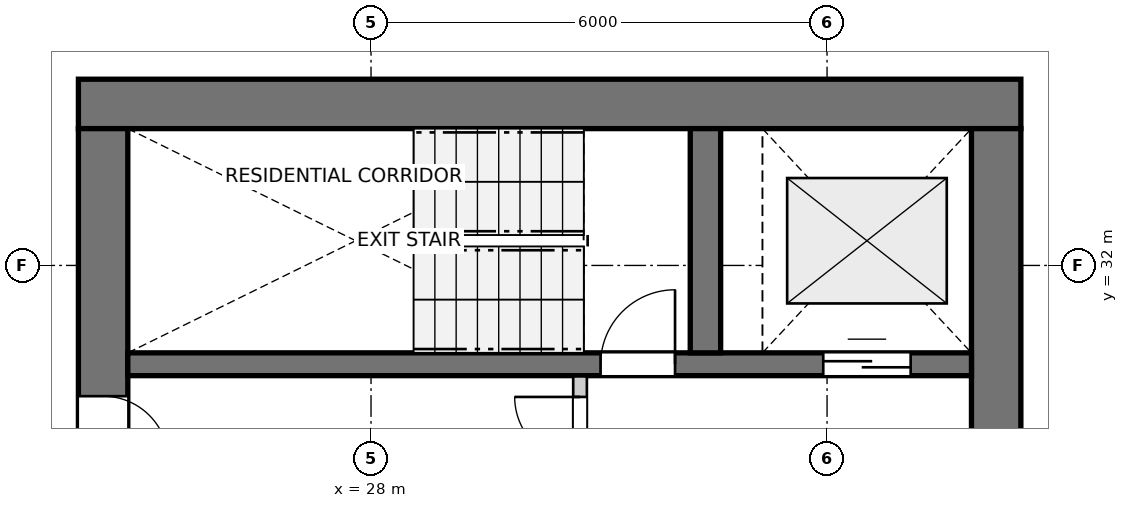
"""IFC4 building model, lengths in metres.
Left out: names, types, materials, properties, quantities, classifications, styles, units other than length and angle.
Written with IfcOpenShell. Run it as: python <this file> out.ifc"""

import sys

from ifc_helpers import new_model, si_unit, direction, frame, frame_2d, origin, place, context, subcontext, project, spatial, rectangle, extrude, source, transform, mapped, element, fill, save


model = new_model("IFC4")
c1 = context("Model", 3, precision=1e-05, world=origin(), true_north=direction((0.0, 1.0)))
c2 = subcontext(c1, "Body", "Model", "MODEL_VIEW")
j1 = project(units=[si_unit("LENGTHUNIT", "METRE"), si_unit("PLANEANGLEUNIT", "RADIAN")], contexts=[c1])
p1 = place(None, origin())
s1 = spatial("IfcSite", under=j1, at=p1, CompositionType="ELEMENT")
p2 = place(p1, origin())
s2 = spatial("IfcBuilding", under=s1, at=p2, CompositionType="ELEMENT")
p3 = place(p2, frame((0.0, 0.0, 76.8)))
s3 = spatial("IfcBuildingStorey", under=s2, at=p3, CompositionType="ELEMENT", Elevation=76.8)
p4 = place(p3, frame((36.55, 34.125, 0.0), z_axis=(0.0, 0.0, 1.0), x_axis=(-1.0, 0.0, 0.0)))
e1 = element("IfcWall", 1, at=p4, inside=s3, PredefinedType="SHEAR", context=c2, shape_type="SweptSolid", body=[
    extrude(rectangle(XDim=12.4, YDim=0.65, at=frame_2d((6.2, 0.0))), origin(), (0.0, 0.0, 1.0), 2.935),
])
p5 = place(p3, frame((24.475, 33.8, 0.0), z_axis=(0.0, 0.0, 1.0), x_axis=(0.0, -1.0, 0.0)))
e2 = element("IfcWall", 2, at=p5, inside=s3, PredefinedType="SHEAR", context=c2, shape_type="SweptSolid", body=[
    extrude(rectangle(XDim=15.6, YDim=0.65, at=frame_2d((7.8, 0.0))), origin(), (0.0, 0.0, 1.0), 2.935),
])
p6 = place(p5, frame((7.05, 0.0, 0.0)))
e3 = element("IfcOpeningElement", 3, at=p6, cuts=e2, PredefinedType="OPENING", context=c2, shape_type="SweptSolid", body=[
    extrude(rectangle(XDim=1.5, YDim=2.15, at=frame_2d((0.75, 1.075))), frame((0.0, 0.335, 0.0), z_axis=(0.0, -1.0, 0.0), x_axis=(1.0, 0.0, 0.0)), (0.0, 0.0, 1.0), 0.67),
])
p7 = place(p5, frame((3.52, 0.0, 0.0)))
e4 = element("IfcOpeningElement", 4, at=p7, cuts=e2, PredefinedType="OPENING", context=c2, shape_type="SweptSolid", body=[
    extrude(rectangle(XDim=0.86, YDim=2.05, at=frame_2d((0.43, 1.025))), frame((0.0, 0.335, 0.0), z_axis=(0.0, -1.0, 0.0), x_axis=(1.0, 0.0, 0.0)), (0.0, 0.0, 1.0), 0.67),
])
p8 = place(p5, frame((11.22, 0.0, 0.0)))
e5 = element("IfcOpeningElement", 5, at=p8, cuts=e2, PredefinedType="OPENING", context=c2, shape_type="SweptSolid", body=[
    extrude(rectangle(XDim=0.86, YDim=2.05, at=frame_2d((0.43, 1.025))), frame((0.0, 0.335, 0.0), z_axis=(0.0, -1.0, 0.0), x_axis=(1.0, 0.0, 0.0)), (0.0, 0.0, 1.0), 0.67),
])
p9 = place(p3, frame((36.225, 18.2, 0.0), z_axis=(0.0, 0.0, 1.0), x_axis=(0.0, 1.0, 0.0)))
e6 = element("IfcWall", 6, at=p9, inside=s3, PredefinedType="SHEAR", context=c2, shape_type="SweptSolid", body=[
    extrude(rectangle(XDim=15.6, YDim=0.65, at=frame_2d((7.8, 0.0))), origin(), (0.0, 0.0, 1.0), 2.935),
])
p10 = place(p9, frame((4.25, 0.0, 0.0)))
e7 = element("IfcOpeningElement", 7, at=p10, cuts=e6, PredefinedType="OPENING", context=c2, shape_type="SweptSolid", body=[
    extrude(rectangle(XDim=1.1, YDim=2.15, at=frame_2d((0.55, 1.075))), frame((0.0, 0.335, 0.0), z_axis=(0.0, -1.0, 0.0), x_axis=(1.0, 0.0, 0.0)), (0.0, 0.0, 1.0), 0.67),
])
p11 = place(p9, frame((10.25, 0.0, 0.0)))
e8 = element("IfcOpeningElement", 8, at=p11, cuts=e6, PredefinedType="OPENING", context=c2, shape_type="SweptSolid", body=[
    extrude(rectangle(XDim=1.1, YDim=2.15, at=frame_2d((0.55, 1.075))), frame((0.0, 0.335, 0.0), z_axis=(0.0, -1.0, 0.0), x_axis=(1.0, 0.0, 0.0)), (0.0, 0.0, 1.0), 0.67),
])
p12 = place(p3, frame((24.8, 30.7, 0.0), z_axis=(0.0, 0.0, 1.0), x_axis=(1.0, 0.0, 0.0)))
e9 = element("IfcWall", 9, at=p12, inside=s3, PredefinedType="SHEAR", context=c2, shape_type="SweptSolid", body=[
    extrude(rectangle(XDim=11.1, YDim=0.3, at=frame_2d((5.55, 0.0))), origin(), (0.0, 0.0, 1.0), 2.935),
])
p13 = place(p12, frame((6.22, 0.0, 0.0)))
e10 = element("IfcOpeningElement", 10, at=p13, cuts=e9, PredefinedType="OPENING", context=c2, shape_type="SweptSolid", body=[
    extrude(rectangle(XDim=0.98, YDim=2.15, at=frame_2d((0.49, 1.075))), frame((0.0, 0.16, 0.0), z_axis=(0.0, -1.0, 0.0), x_axis=(1.0, 0.0, 0.0)), (0.0, 0.0, 1.0), 0.32),
])
p14 = place(p12, frame((9.15, 0.0, 0.0)))
e11 = element("IfcOpeningElement", 11, at=p14, cuts=e9, PredefinedType="OPENING", context=c2, shape_type="SweptSolid", body=[
    extrude(rectangle(XDim=1.15, YDim=2.15, at=frame_2d((0.575, 1.075))), frame((0.0, 0.16, 0.0), z_axis=(0.0, -1.0, 0.0), x_axis=(1.0, 0.0, 0.0)), (0.0, 0.0, 1.0), 0.32),
])
p15 = place(p3, frame((32.4, 30.85, 0.0), z_axis=(0.0, 0.0, 1.0), x_axis=(0.0, 1.0, 0.0)))
e12 = element("IfcWall", 12, at=p15, inside=s3, PredefinedType="SHEAR", context=c2, shape_type="SweptSolid", body=[
    extrude(rectangle(XDim=2.95, YDim=0.4, at=frame_2d((1.475, 0.0))), origin(), (0.0, 0.0, 1.0), 2.935),
])
p16 = place(p3, frame((30.75, 27.43, 0.0), z_axis=(0.0, 0.0, 1.0), x_axis=(0.0, 1.0, 0.0)))
e13 = element("IfcWall", 13, at=p16, inside=s3, PredefinedType="PARTITIONING", context=c2, shape_type="SweptSolid", body=[
    extrude(rectangle(XDim=3.11, YDim=0.18, at=frame_2d((1.555, 0.0))), origin(), (0.0, 0.0, 1.0), 2.935),
])
p17 = place(p16, frame((1.98, 0.0, 0.0)))
e14 = element("IfcOpeningElement", 14, at=p17, cuts=e13, PredefinedType="OPENING", context=c2, shape_type="SweptSolid", body=[
    extrude(rectangle(XDim=0.86, YDim=2.05, at=frame_2d((0.43, 1.025))), frame((0.0, 0.1, 0.0), z_axis=(0.0, -1.0, 0.0), x_axis=(1.0, 0.0, 0.0)), (0.0, 0.0, 1.0), 0.2),
])
m1 = source(origin(), c2, "Body", "SweptSolid", [
    extrude(rectangle(XDim=0.98, YDim=2.15, at=frame_2d((0.49, 1.075))), frame((0.0, 0.025, 0.0), z_axis=(0.0, -1.0, 0.0), x_axis=(1.0, 0.0, 0.0)), (0.0, 0.0, 1.0), 0.05),
])
p18 = place(p13, origin())
e15 = element("IfcDoor", 15, at=p18, inside=s3, OperationType="SINGLE_SWING_RIGHT", PredefinedType="DOOR", context=c2, shape_type="MappedRepresentation", body=[
    mapped(m1, transform((0.0, 0.0, 0.0), x_axis=(1.0, 0.0, 0.0), y_axis=(0.0, 1.0, 0.0), z_axis=(0.0, 0.0, 1.0), scale=1.0)),
])
fill(e10, e15)
m2 = source(origin(), c2, "Body", "SweptSolid", [
    extrude(rectangle(XDim=1.15, YDim=2.15, at=frame_2d((0.575, 1.075))), frame((0.0, 0.025, 0.0), z_axis=(0.0, -1.0, 0.0), x_axis=(1.0, 0.0, 0.0)), (0.0, 0.0, 1.0), 0.05),
])
p19 = place(p14, origin())
e16 = element("IfcDoor", 16, at=p19, inside=s3, OperationType="DOUBLE_DOOR_SLIDING", PredefinedType="DOOR", context=c2, shape_type="MappedRepresentation", body=[
    mapped(m2, transform((0.0, 0.0, 0.0), x_axis=(1.0, 0.0, 0.0), y_axis=(0.0, 1.0, 0.0), z_axis=(0.0, 0.0, 1.0), scale=1.0)),
])
fill(e11, e16)
m3 = source(origin(), c2, "Body", "SweptSolid", [
    extrude(rectangle(XDim=0.86, YDim=2.05, at=frame_2d((0.43, 1.025))), frame((0.0, 0.025, 0.0), z_axis=(0.0, -1.0, 0.0), x_axis=(1.0, 0.0, 0.0)), (0.0, 0.0, 1.0), 0.05),
])
p20 = place(p7, origin())
e17 = element("IfcDoor", 17, at=p20, inside=s3, OperationType="SINGLE_SWING_RIGHT", PredefinedType="DOOR", context=c2, shape_type="MappedRepresentation", body=[
    mapped(m3, transform((0.0, 0.0, 0.0), x_axis=(1.0, 0.0, 0.0), y_axis=(0.0, 1.0, 0.0), z_axis=(0.0, 0.0, 1.0), scale=1.0)),
])
fill(e4, e17)
p21 = place(p17, origin())
e18 = element("IfcDoor", 18, at=p21, inside=s3, OperationType="SINGLE_SWING_RIGHT", PredefinedType="DOOR", context=c2, shape_type="MappedRepresentation", body=[
    mapped(m3, transform((0.0, 0.0, 0.0), x_axis=(1.0, 0.0, 0.0), y_axis=(0.0, 1.0, 0.0), z_axis=(0.0, 0.0, 1.0), scale=1.0)),
])
fill(e14, e18)
save(model, sys.argv[1])
